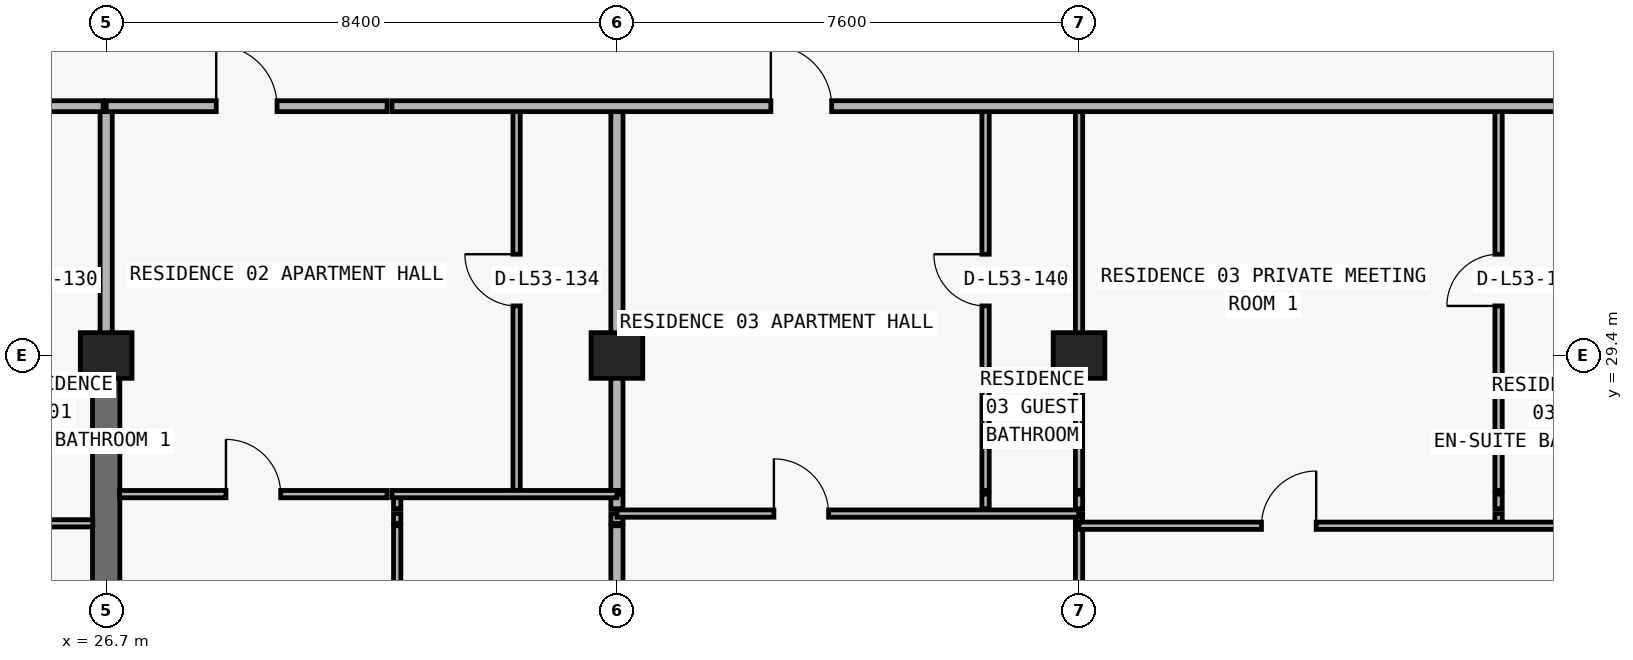
"""IFC4 building model, lengths in metres.
Left out: names, types, materials, properties, quantities, classifications, styles, units other than length and angle.
Written with IfcOpenShell. Run it as: python <this file> out.ifc"""

import sys

from ifc_helpers import new_model, si_unit, direction, frame, frame_2d, origin, origin_2d, place, context, subcontext, project, spatial, rectangle, extrude, element, fill, save


model = new_model("IFC4")
c1 = context("Model", 3, precision=1e-05, world=origin(), true_north=direction((0.0, 1.0)))
c2 = subcontext(c1, "Body", "Model", "MODEL_VIEW")
j1 = project(units=[si_unit("LENGTHUNIT", "METRE"), si_unit("PLANEANGLEUNIT", "RADIAN")], contexts=[c1])
p1 = place(None, origin())
s1 = spatial("IfcSite", under=j1, at=p1, CompositionType="ELEMENT")
p2 = place(p1, origin())
s2 = spatial("IfcBuilding", under=s1, at=p2, CompositionType="ELEMENT")
p3 = place(p2, frame((0.0, 0.0, 191.7)))
s3 = spatial("IfcBuildingStorey", under=s2, at=p3, CompositionType="ELEMENT", Elevation=191.7)
for number, where, z_axis, x_axis in (
    (1, (26.7, 29.4, 0.0), (0.0, 0.0, 1.0), (1.0, 0.0, 0.0)),
    (2, (35.1, 29.4, 0.0), (0.0, 0.0, 1.0), (1.0, 0.0, 0.0)),
    (3, (42.7, 29.4, 0.0), (0.0, 0.0, 1.0), (1.0, 0.0, 0.0)),
):
    element("IfcColumn", number, at=place(p3, frame(where, z_axis=z_axis, x_axis=x_axis)), inside=s3, PredefinedType="COLUMN", context=c2, shape_type="SweptSolid", body=[
        extrude(rectangle(XDim=0.85, YDim=0.75, at=origin_2d()), origin(), (0.0, 0.0, 1.0), 3.05),
    ])
p4 = place(p3, frame((26.7, 20.8, 0.0), z_axis=(0.0, 0.0, 1.0), x_axis=(0.0, 1.0, 0.0)))
e4 = element("IfcWall", 4, at=p4, inside=s3, PredefinedType="SHEAR", context=c2, shape_type="SweptSolid", body=[
    extrude(rectangle(XDim=8.6, YDim=0.45, at=frame_2d((4.3, 0.0))), origin(), (0.0, 0.0, 1.0), 3.05),
])
p5 = place(p3, frame((26.7, 29.405, 0.0), z_axis=(0.0, 0.0, 1.0), x_axis=(0.0, 1.0, 0.0)))
e5 = element("IfcWall", 5, at=p5, inside=s3, PredefinedType="PARTITIONING", context=c2, shape_type="SweptSolid", body=[
    extrude(rectangle(XDim=4.095, YDim=0.2, at=frame_2d((2.047, 0.0))), origin(), (0.0, 0.0, 1.0), 2.335),
])
p6 = place(p3, frame((31.486, 22.24, 0.0), z_axis=(0.0, 0.0, 1.0), x_axis=(0.0, 1.0, 0.0)))
e6 = element("IfcWall", 6, at=p6, inside=s3, PredefinedType="PARTITIONING", context=c2, shape_type="SweptSolid", body=[
    extrude(rectangle(XDim=4.36, YDim=0.12, at=frame_2d((2.18, 0.0))), origin(), (0.0, 0.0, 1.0), 3.05),
])
p7 = place(p6, frame((1.73, 0.0, 0.0)))
e7 = element("IfcOpeningElement", 7, at=p7, cuts=e6, PredefinedType="OPENING", context=c2, shape_type="SweptSolid", body=[
    extrude(rectangle(XDim=0.9, YDim=2.15, at=frame_2d((0.45, 1.075))), frame((0.0, 0.07, 0.0), z_axis=(0.0, -1.0, 0.0), x_axis=(1.0, 0.0, 0.0)), (0.0, 0.0, 1.0), 0.14),
])
p8 = place(p3, frame((31.486, 26.64, 0.0), z_axis=(0.0, 0.0, 1.0), x_axis=(0.0, 1.0, 0.0)))
e8 = element("IfcWall", 8, at=p8, inside=s3, PredefinedType="PARTITIONING", context=c2, shape_type="SweptSolid", body=[
    extrude(rectangle(XDim=0.16, YDim=0.12, at=frame_2d((0.08, 0.0))), origin(), (0.0, 0.0, 1.0), 3.05),
])
p9 = place(p3, frame((31.486, 26.88, 0.0), z_axis=(0.0, 0.0, 1.0), x_axis=(0.0, 1.0, 0.0)))
e9 = element("IfcWall", 9, at=p9, inside=s3, PredefinedType="PARTITIONING", context=c2, shape_type="SweptSolid", body=[
    extrude(rectangle(XDim=0.24, YDim=0.12, at=frame_2d((0.12, 0.0))), origin(), (0.0, 0.0, 1.0), 3.05),
])
p10 = place(p3, frame((33.45, 27.18, 0.0), z_axis=(0.0, 0.0, 1.0), x_axis=(0.0, 1.0, 0.0)))
e10 = element("IfcWall", 10, at=p10, inside=s3, PredefinedType="PARTITIONING", context=c2, shape_type="SweptSolid", body=[
    extrude(rectangle(XDim=6.32, YDim=0.12, at=frame_2d((3.16, 0.0))), origin(), (0.0, 0.0, 1.0), 3.05),
])
p11 = place(p10, frame((3.035, 0.0, 0.0)))
e11 = element("IfcOpeningElement", 11, at=p11, cuts=e10, PredefinedType="OPENING", context=c2, shape_type="SweptSolid", body=[
    extrude(rectangle(XDim=0.85, YDim=2.1, at=frame_2d((0.425, 1.05))), frame((0.0, 0.07, 0.0), z_axis=(0.0, -1.0, 0.0), x_axis=(1.0, 0.0, 0.0)), (0.0, 0.0, 1.0), 0.14),
])
p12 = place(p3, frame((35.1, 22.24, 0.0), z_axis=(0.0, 0.0, 1.0), x_axis=(0.0, 1.0, 0.0)))
e12 = element("IfcWall", 12, at=p12, inside=s3, PredefinedType="PARTITIONING", context=c2, shape_type="SweptSolid", body=[
    extrude(rectangle(XDim=4.36, YDim=0.2, at=frame_2d((2.18, 0.0))), origin(), (0.0, 0.0, 1.0), 2.263),
])
p13 = place(p3, frame((35.1, 26.64, 0.0), z_axis=(0.0, 0.0, 1.0), x_axis=(0.0, 1.0, 0.0)))
e13 = element("IfcWall", 13, at=p13, inside=s3, PredefinedType="PARTITIONING", context=c2, shape_type="SweptSolid", body=[
    extrude(rectangle(XDim=0.16, YDim=0.2, at=frame_2d((0.08, 0.0))), origin(), (0.0, 0.0, 1.0), 2.263),
])
p14 = place(p3, frame((35.1, 26.88, 0.0), z_axis=(0.0, 0.0, 1.0), x_axis=(0.0, 1.0, 0.0)))
e14 = element("IfcWall", 14, at=p14, inside=s3, PredefinedType="PARTITIONING", context=c2, shape_type="SweptSolid", body=[
    extrude(rectangle(XDim=0.24, YDim=0.2, at=frame_2d((0.12, 0.0))), origin(), (0.0, 0.0, 1.0), 2.263),
])
p15 = place(p3, frame((35.1, 27.18, 0.0), z_axis=(0.0, 0.0, 1.0), x_axis=(0.0, 1.0, 0.0)))
e15 = element("IfcWall", 15, at=p15, inside=s3, PredefinedType="PARTITIONING", context=c2, shape_type="SweptSolid", body=[
    extrude(rectangle(XDim=6.32, YDim=0.2, at=frame_2d((3.16, 0.0))), origin(), (0.0, 0.0, 1.0), 2.263),
])
p16 = place(p3, frame((41.163, 26.88, 0.0), z_axis=(0.0, 0.0, 1.0), x_axis=(0.0, 1.0, 0.0)))
e16 = element("IfcWall", 16, at=p16, inside=s3, PredefinedType="PARTITIONING", context=c2, shape_type="SweptSolid", body=[
    extrude(rectangle(XDim=0.24, YDim=0.12, at=frame_2d((0.12, 0.0))), origin(), (0.0, 0.0, 1.0), 3.05),
])
p17 = place(p3, frame((41.163, 27.18, 0.0), z_axis=(0.0, 0.0, 1.0), x_axis=(0.0, 1.0, 0.0)))
e17 = element("IfcWall", 17, at=p17, inside=s3, PredefinedType="PARTITIONING", context=c2, shape_type="SweptSolid", body=[
    extrude(rectangle(XDim=6.32, YDim=0.12, at=frame_2d((3.16, 0.0))), origin(), (0.0, 0.0, 1.0), 3.05),
])
p18 = place(p17, frame((3.035, 0.0, 0.0)))
e18 = element("IfcOpeningElement", 18, at=p18, cuts=e17, PredefinedType="OPENING", context=c2, shape_type="SweptSolid", body=[
    extrude(rectangle(XDim=0.85, YDim=2.1, at=frame_2d((0.425, 1.05))), frame((0.0, 0.07, 0.0), z_axis=(0.0, -1.0, 0.0), x_axis=(1.0, 0.0, 0.0)), (0.0, 0.0, 1.0), 0.14),
])
p19 = place(p3, frame((42.7, 22.24, 0.0), z_axis=(0.0, 0.0, 1.0), x_axis=(0.0, 1.0, 0.0)))
e19 = element("IfcWall", 19, at=p19, inside=s3, PredefinedType="PARTITIONING", context=c2, shape_type="SweptSolid", body=[
    extrude(rectangle(XDim=4.36, YDim=0.12, at=frame_2d((2.18, 0.0))), origin(), (0.0, 0.0, 1.0), 2.263),
])
p20 = place(p19, frame((1.73, 0.0, 0.0)))
e20 = element("IfcOpeningElement", 20, at=p20, cuts=e19, PredefinedType="OPENING", context=c2, shape_type="SweptSolid", body=[
    extrude(rectangle(XDim=0.9, YDim=2.15, at=frame_2d((0.45, 1.075))), frame((0.0, 0.07, 0.0), z_axis=(0.0, -1.0, 0.0), x_axis=(1.0, 0.0, 0.0)), (0.0, 0.0, 1.0), 0.14),
])
p21 = place(p3, frame((42.7, 26.64, 0.0), z_axis=(0.0, 0.0, 1.0), x_axis=(0.0, 1.0, 0.0)))
e21 = element("IfcWall", 21, at=p21, inside=s3, PredefinedType="PARTITIONING", context=c2, shape_type="SweptSolid", body=[
    extrude(rectangle(XDim=0.16, YDim=0.12, at=frame_2d((0.08, 0.0))), origin(), (0.0, 0.0, 1.0), 2.263),
])
p22 = place(p3, frame((42.7, 26.88, 0.0), z_axis=(0.0, 0.0, 1.0), x_axis=(0.0, 1.0, 0.0)))
e22 = element("IfcWall", 22, at=p22, inside=s3, PredefinedType="PARTITIONING", context=c2, shape_type="SweptSolid", body=[
    extrude(rectangle(XDim=0.24, YDim=0.12, at=frame_2d((0.12, 0.0))), origin(), (0.0, 0.0, 1.0), 2.263),
])
p23 = place(p3, frame((42.7, 27.18, 0.0), z_axis=(0.0, 0.0, 1.0), x_axis=(0.0, 1.0, 0.0)))
e23 = element("IfcWall", 23, at=p23, inside=s3, PredefinedType="PARTITIONING", context=c2, shape_type="SweptSolid", body=[
    extrude(rectangle(XDim=6.32, YDim=0.12, at=frame_2d((3.16, 0.0))), origin(), (0.0, 0.0, 1.0), 2.263),
])
p24 = place(p3, frame((49.6, 26.64, 0.0), z_axis=(0.0, 0.0, 1.0), x_axis=(0.0, 1.0, 0.0)))
e24 = element("IfcWall", 24, at=p24, inside=s3, PredefinedType="PARTITIONING", context=c2, shape_type="SweptSolid", body=[
    extrude(rectangle(XDim=0.16, YDim=0.12, at=frame_2d((0.08, 0.0))), origin(), (0.0, 0.0, 1.0), 3.05),
])
p25 = place(p3, frame((49.6, 26.88, 0.0), z_axis=(0.0, 0.0, 1.0), x_axis=(0.0, 1.0, 0.0)))
e25 = element("IfcWall", 25, at=p25, inside=s3, PredefinedType="PARTITIONING", context=c2, shape_type="SweptSolid", body=[
    extrude(rectangle(XDim=0.24, YDim=0.12, at=frame_2d((0.12, 0.0))), origin(), (0.0, 0.0, 1.0), 3.05),
])
p26 = place(p3, frame((49.6, 27.18, 0.0), z_axis=(0.0, 0.0, 1.0), x_axis=(0.0, 1.0, 0.0)))
e26 = element("IfcWall", 26, at=p26, inside=s3, PredefinedType="PARTITIONING", context=c2, shape_type="SweptSolid", body=[
    extrude(rectangle(XDim=6.32, YDim=0.12, at=frame_2d((3.16, 0.0))), origin(), (0.0, 0.0, 1.0), 3.05),
])
p27 = place(p26, frame((3.035, 0.0, 0.0)))
e27 = element("IfcOpeningElement", 27, at=p27, cuts=e26, PredefinedType="OPENING", context=c2, shape_type="SweptSolid", body=[
    extrude(rectangle(XDim=0.85, YDim=2.1, at=frame_2d((0.425, 1.05))), frame((0.0, 0.07, 0.0), z_axis=(0.0, -1.0, 0.0), x_axis=(1.0, 0.0, 0.0)), (0.0, 0.0, 1.0), 0.14),
])
p28 = place(p3, frame((42.7, 26.6, 0.0), z_axis=(0.0, 0.0, 1.0), x_axis=(1.0, 0.0, 0.0)))
e28 = element("IfcWall", 28, at=p28, inside=s3, PredefinedType="PARTITIONING", context=c2, shape_type="SweptSolid", body=[
    extrude(rectangle(XDim=8.18, YDim=0.12, at=frame_2d((4.09, 0.0))), origin(), (0.0, 0.0, 1.0), 3.05),
])
p29 = place(p28, frame((3.0, 0.0, 0.0)))
e29 = element("IfcOpeningElement", 29, at=p29, cuts=e28, PredefinedType="OPENING", context=c2, shape_type="SweptSolid", body=[
    extrude(rectangle(XDim=0.9, YDim=2.15, at=frame_2d((0.45, 1.075))), frame((0.0, 0.07, 0.0), z_axis=(0.0, -1.0, 0.0), x_axis=(1.0, 0.0, 0.0)), (0.0, 0.0, 1.0), 0.14),
])
p30 = place(p3, frame((18.3, 26.64, 0.0), z_axis=(0.0, 0.0, 1.0), x_axis=(1.0, 0.0, 0.0)))
e30 = element("IfcWall", 30, at=p30, inside=s3, PredefinedType="PARTITIONING", context=c2, shape_type="SweptSolid", body=[
    extrude(rectangle(XDim=8.18, YDim=0.12, at=frame_2d((4.09, 0.0))), origin(), (0.0, 0.0, 1.0), 3.05),
])
p31 = place(p30, frame((3.0, 0.0, 0.0)))
e31 = element("IfcOpeningElement", 31, at=p31, cuts=e30, PredefinedType="OPENING", context=c2, shape_type="SweptSolid", body=[
    extrude(rectangle(XDim=0.9, YDim=2.15, at=frame_2d((0.45, 1.075))), frame((0.0, 0.07, 0.0), z_axis=(0.0, -1.0, 0.0), x_axis=(1.0, 0.0, 0.0)), (0.0, 0.0, 1.0), 0.14),
])
p32 = place(p3, frame((35.1, 26.8, 0.0), z_axis=(0.0, 0.0, 1.0), x_axis=(1.0, 0.0, 0.0)))
e32 = element("IfcWall", 32, at=p32, inside=s3, PredefinedType="PARTITIONING", context=c2, shape_type="SweptSolid", body=[
    extrude(rectangle(XDim=7.595, YDim=0.12, at=frame_2d((3.797, 0.0))), origin(), (0.0, 0.0, 1.0), 3.05),
])
p33 = place(p32, frame((2.582, 0.0, 0.0)))
e33 = element("IfcOpeningElement", 33, at=p33, cuts=e32, PredefinedType="OPENING", context=c2, shape_type="SweptSolid", body=[
    extrude(rectangle(XDim=0.9, YDim=2.15, at=frame_2d((0.45, 1.075))), frame((0.0, 0.07, 0.0), z_axis=(0.0, -1.0, 0.0), x_axis=(1.0, 0.0, 0.0)), (0.0, 0.0, 1.0), 0.14),
])
p34 = place(p3, frame((26.92, 27.12, 0.0), z_axis=(0.0, 0.0, 1.0), x_axis=(1.0, 0.0, 0.0)))
e34 = element("IfcWall", 34, at=p34, inside=s3, PredefinedType="PARTITIONING", context=c2, shape_type="SweptSolid", body=[
    extrude(rectangle(XDim=4.4, YDim=0.12, at=frame_2d((2.2, 0.0))), origin(), (0.0, 0.0, 1.0), 3.05),
])
p35 = place(p34, frame((1.75, 0.0, 0.0)))
e35 = element("IfcOpeningElement", 35, at=p35, cuts=e34, PredefinedType="OPENING", context=c2, shape_type="SweptSolid", body=[
    extrude(rectangle(XDim=0.9, YDim=2.15, at=frame_2d((0.45, 1.075))), frame((0.0, 0.07, 0.0), z_axis=(0.0, -1.0, 0.0), x_axis=(1.0, 0.0, 0.0)), (0.0, 0.0, 1.0), 0.14),
])
p36 = place(p3, frame((31.4, 27.12, 0.0), z_axis=(0.0, 0.0, 1.0), x_axis=(1.0, 0.0, 0.0)))
e36 = element("IfcWall", 36, at=p36, inside=s3, PredefinedType="PARTITIONING", context=c2, shape_type="SweptSolid", body=[
    extrude(rectangle(XDim=3.7, YDim=0.12, at=frame_2d((1.85, 0.0))), origin(), (0.0, 0.0, 1.0), 3.05),
])
p37 = place(p3, frame((10.105, 33.5, 0.0), z_axis=(0.0, 0.0, 1.0), x_axis=(1.0, 0.0, 0.0)))
e37 = element("IfcWall", 37, at=p37, inside=s3, PredefinedType="PARTITIONING", context=c2, shape_type="SweptSolid", body=[
    extrude(rectangle(XDim=16.545, YDim=0.18, at=frame_2d((8.272, 0.0))), origin(), (0.0, 0.0, 1.0), 3.05),
])
p38 = place(p37, frame((2.824, 0.0, 0.0)))
e38 = element("IfcOpeningElement", 38, at=p38, cuts=e37, PredefinedType="OPENING", context=c2, shape_type="SweptSolid", body=[
    extrude(rectangle(XDim=1.0, YDim=2.2, at=frame_2d((0.5, 1.1))), frame((0.0, 0.1, 0.0), z_axis=(0.0, -1.0, 0.0), x_axis=(1.0, 0.0, 0.0)), (0.0, 0.0, 1.0), 0.2),
])
p39 = place(p3, frame((26.7, 33.5, 0.0), z_axis=(0.0, 0.0, 1.0), x_axis=(1.0, 0.0, 0.0)))
e39 = element("IfcWall", 39, at=p39, inside=s3, PredefinedType="PARTITIONING", context=c2, shape_type="SweptSolid", body=[
    extrude(rectangle(XDim=4.62, YDim=0.18, at=frame_2d((2.31, 0.0))), origin(), (0.0, 0.0, 1.0), 3.05),
])
p40 = place(p39, frame((1.81, 0.0, 0.0)))
e40 = element("IfcOpeningElement", 40, at=p40, cuts=e39, PredefinedType="OPENING", context=c2, shape_type="SweptSolid", body=[
    extrude(rectangle(XDim=1.0, YDim=2.2, at=frame_2d((0.5, 1.1))), frame((0.0, 0.1, 0.0), z_axis=(0.0, -1.0, 0.0), x_axis=(1.0, 0.0, 0.0)), (0.0, 0.0, 1.0), 0.2),
])
p41 = place(p3, frame((31.4, 33.5, 0.0), z_axis=(0.0, 0.0, 1.0), x_axis=(1.0, 0.0, 0.0)))
e41 = element("IfcWall", 41, at=p41, inside=s3, PredefinedType="PARTITIONING", context=c2, shape_type="SweptSolid", body=[
    extrude(rectangle(XDim=36.3, YDim=0.18, at=frame_2d((18.15, 0.0))), origin(), (0.0, 0.0, 1.0), 3.05),
])
p42 = place(p41, frame((6.231, 0.0, 0.0)))
e42 = element("IfcOpeningElement", 42, at=p42, cuts=e41, PredefinedType="OPENING", context=c2, shape_type="SweptSolid", body=[
    extrude(rectangle(XDim=1.0, YDim=2.2, at=frame_2d((0.5, 1.1))), frame((0.0, 0.1, 0.0), z_axis=(0.0, -1.0, 0.0), x_axis=(1.0, 0.0, 0.0)), (0.0, 0.0, 1.0), 0.2),
])
p43 = place(p41, frame((22.575, 0.0, 0.0)))
e43 = element("IfcOpeningElement", 43, at=p43, cuts=e41, PredefinedType="OPENING", context=c2, shape_type="SweptSolid", body=[
    extrude(rectangle(XDim=1.0, YDim=2.2, at=frame_2d((0.5, 1.1))), frame((0.0, 0.1, 0.0), z_axis=(0.0, -1.0, 0.0), x_axis=(1.0, 0.0, 0.0)), (0.0, 0.0, 1.0), 0.2),
])
p44 = place(p41, frame((30.875, 0.0, 0.0)))
e44 = element("IfcOpeningElement", 44, at=p44, cuts=e41, PredefinedType="OPENING", context=c2, shape_type="SweptSolid", body=[
    extrude(rectangle(XDim=1.0, YDim=2.2, at=frame_2d((0.5, 1.1))), frame((0.0, 0.1, 0.0), z_axis=(0.0, -1.0, 0.0), x_axis=(1.0, 0.0, 0.0)), (0.0, 0.0, 1.0), 0.2),
])
p45 = place(p40, origin())
e45 = element("IfcDoor", 45, at=p45, inside=s3, OperationType="SINGLE_SWING_LEFT", PredefinedType="DOOR", context=c2, shape_type="SweptSolid", body=[
    extrude(rectangle(XDim=1.0, YDim=2.2, at=frame_2d((0.5, 1.1))), frame((0.0, 0.025, 0.0), z_axis=(0.0, -1.0, 0.0), x_axis=(1.0, 0.0, 0.0)), (0.0, 0.0, 1.0), 0.05),
])
fill(e40, e45)
p46 = place(p11, origin())
e46 = element("IfcDoor", 46, at=p46, inside=s3, OperationType="SINGLE_SWING_RIGHT", PredefinedType="DOOR", context=c2, shape_type="SweptSolid", body=[
    extrude(rectangle(XDim=0.85, YDim=2.1, at=frame_2d((0.425, 1.05))), frame((0.0, 0.025, 0.0), z_axis=(0.0, -1.0, 0.0), x_axis=(1.0, 0.0, 0.0)), (0.0, 0.0, 1.0), 0.05),
])
fill(e11, e46)
p47 = place(p35, origin())
e47 = element("IfcDoor", 47, at=p47, inside=s3, OperationType="SINGLE_SWING_LEFT", PredefinedType="DOOR", context=c2, shape_type="SweptSolid", body=[
    extrude(rectangle(XDim=0.9, YDim=2.15, at=frame_2d((0.45, 1.075))), frame((0.0, 0.025, 0.0), z_axis=(0.0, -1.0, 0.0), x_axis=(1.0, 0.0, 0.0)), (0.0, 0.0, 1.0), 0.05),
])
fill(e35, e47)
p48 = place(p42, origin())
e48 = element("IfcDoor", 48, at=p48, inside=s3, OperationType="SINGLE_SWING_LEFT", PredefinedType="DOOR", context=c2, shape_type="SweptSolid", body=[
    extrude(rectangle(XDim=1.0, YDim=2.2, at=frame_2d((0.5, 1.1))), frame((0.0, 0.025, 0.0), z_axis=(0.0, -1.0, 0.0), x_axis=(1.0, 0.0, 0.0)), (0.0, 0.0, 1.0), 0.05),
])
fill(e42, e48)
p49 = place(p18, origin())
e49 = element("IfcDoor", 49, at=p49, inside=s3, OperationType="SINGLE_SWING_RIGHT", PredefinedType="DOOR", context=c2, shape_type="SweptSolid", body=[
    extrude(rectangle(XDim=0.85, YDim=2.1, at=frame_2d((0.425, 1.05))), frame((0.0, 0.025, 0.0), z_axis=(0.0, -1.0, 0.0), x_axis=(1.0, 0.0, 0.0)), (0.0, 0.0, 1.0), 0.05),
])
fill(e18, e49)
p50 = place(p33, origin())
e50 = element("IfcDoor", 50, at=p50, inside=s3, OperationType="SINGLE_SWING_LEFT", PredefinedType="DOOR", context=c2, shape_type="SweptSolid", body=[
    extrude(rectangle(XDim=0.9, YDim=2.15, at=frame_2d((0.45, 1.075))), frame((0.0, 0.025, 0.0), z_axis=(0.0, -1.0, 0.0), x_axis=(1.0, 0.0, 0.0)), (0.0, 0.0, 1.0), 0.05),
])
fill(e33, e50)
p51 = place(p29, origin())
e51 = element("IfcDoor", 51, at=p51, inside=s3, OperationType="SINGLE_SWING_RIGHT", PredefinedType="DOOR", context=c2, shape_type="SweptSolid", body=[
    extrude(rectangle(XDim=0.9, YDim=2.15, at=frame_2d((0.45, 1.075))), frame((0.0, 0.025, 0.0), z_axis=(0.0, -1.0, 0.0), x_axis=(1.0, 0.0, 0.0)), (0.0, 0.0, 1.0), 0.05),
])
fill(e29, e51)
p52 = place(p27, origin())
e52 = element("IfcDoor", 52, at=p52, inside=s3, OperationType="SINGLE_SWING_LEFT", PredefinedType="DOOR", context=c2, shape_type="SweptSolid", body=[
    extrude(rectangle(XDim=0.85, YDim=2.1, at=frame_2d((0.425, 1.05))), frame((0.0, 0.025, 0.0), z_axis=(0.0, -1.0, 0.0), x_axis=(1.0, 0.0, 0.0)), (0.0, 0.0, 1.0), 0.05),
])
fill(e27, e52)
save(model, sys.argv[1])
